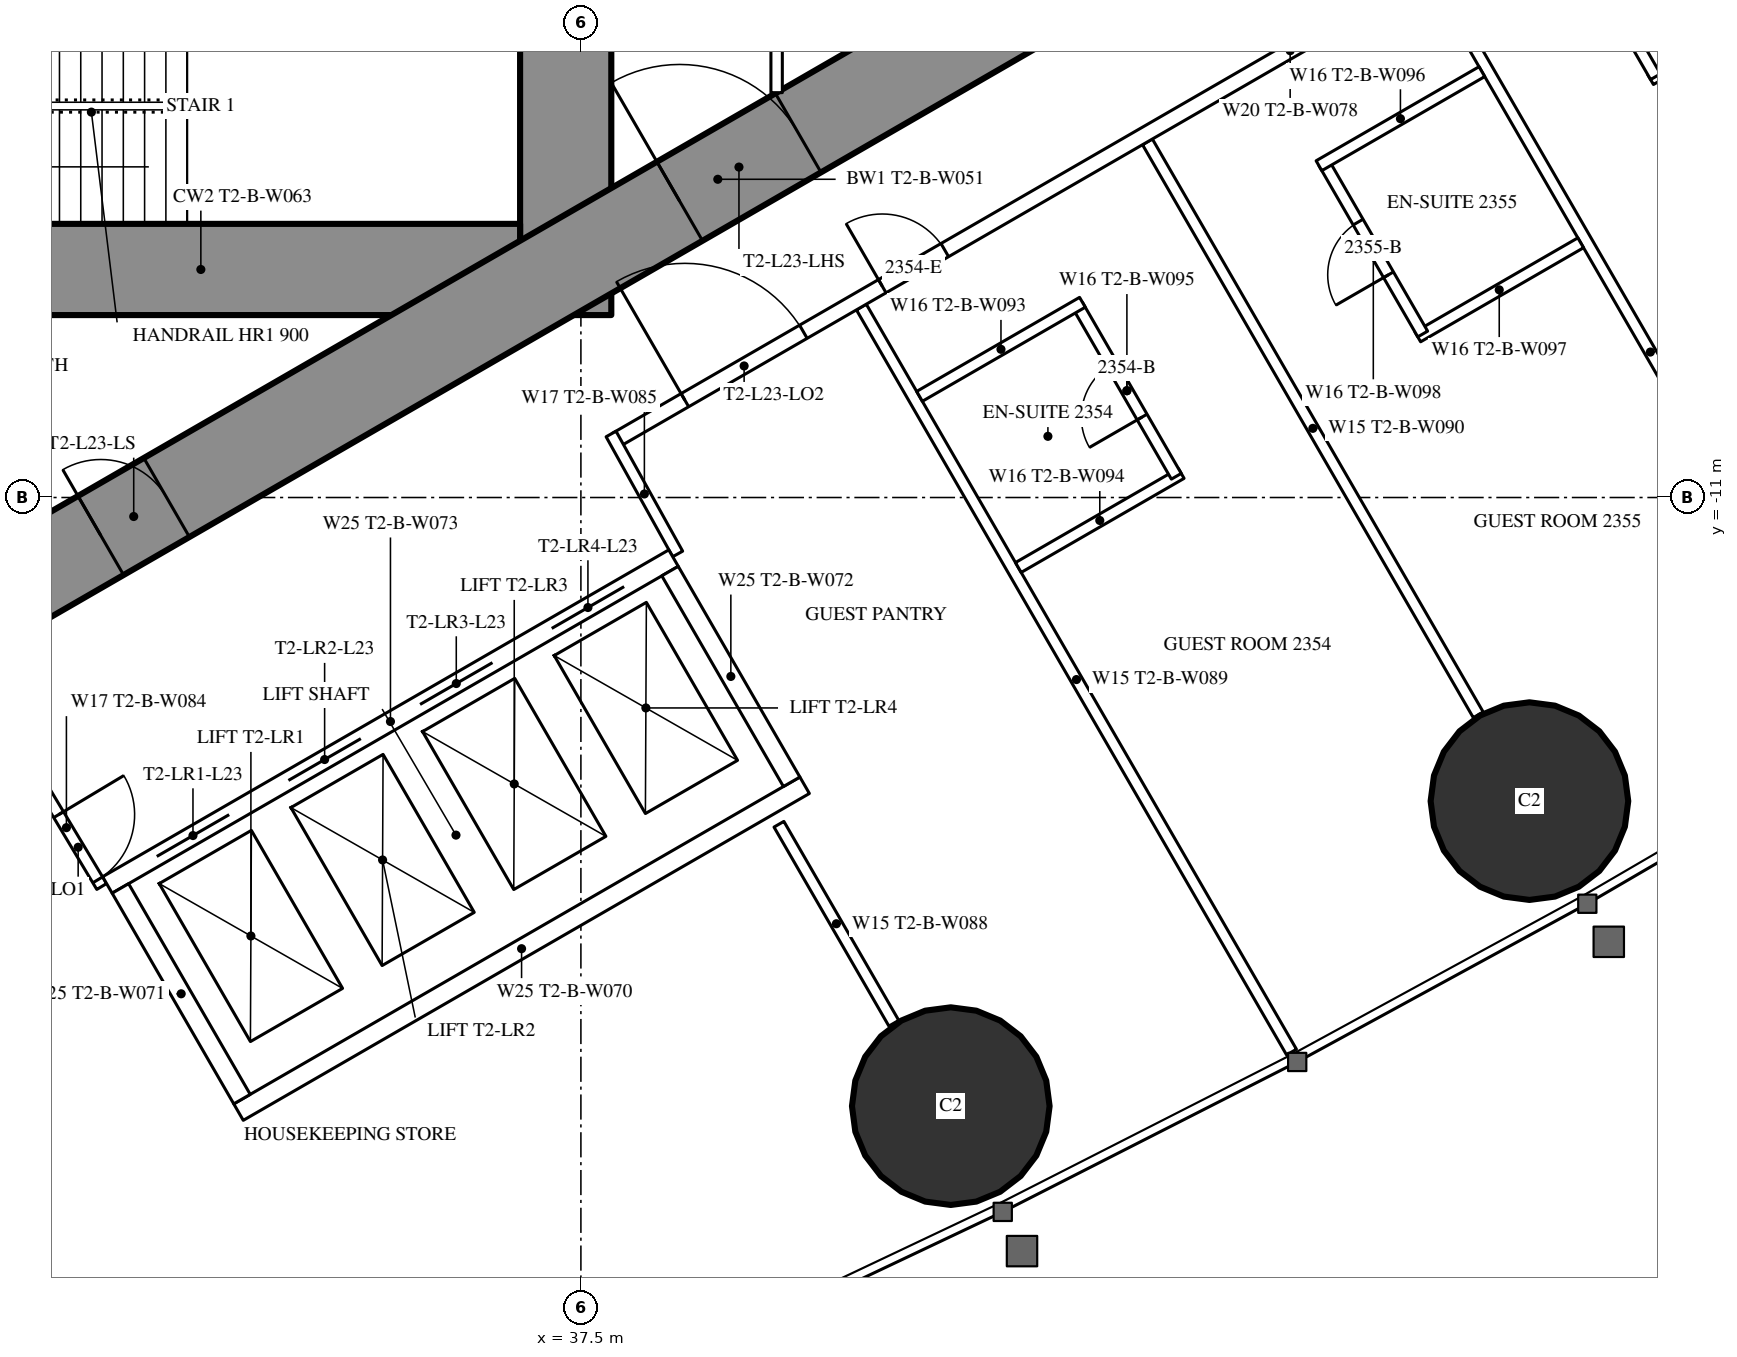
"""IFC4 building model, lengths in metres.
Left out: names, types, materials, properties, quantities, classifications, styles, units other than length and angle.
Written with IfcOpenShell. Run it as: python <this file> out.ifc"""

import sys

from ifc_helpers import new_model, si_unit, direction, frame, frame_2d, origin, origin_2d, place, context, subcontext, project, spatial, rectangle, hollow_circle, extrude, element, fill, save


model = new_model("IFC4")
c1 = context("Model", 3, precision=1e-05, world=origin(), true_north=direction((0.0, 1.0)))
c2 = subcontext(c1, "Body", "Model", "MODEL_VIEW")
j1 = project(units=[si_unit("LENGTHUNIT", "METRE"), si_unit("PLANEANGLEUNIT", "RADIAN")], contexts=[c1])
p1 = place(None, origin())
s1 = spatial("IfcSite", under=j1, at=p1, CompositionType="ELEMENT")
p2 = place(p1, origin())
s2 = spatial("IfcBuilding", under=s1, at=p2, CompositionType="ELEMENT")
p3 = place(p2, frame((0.0, 0.0, 90.6)))
s3 = spatial("IfcBuildingStorey", under=s2, at=p3, CompositionType="ELEMENT", Elevation=90.6)
for number, where, z_axis, x_axis in (
    (1, (42.366, -19.007, 0.0), (0.0, 0.0, 1.0), (1.0, 0.0, 0.0)),
    (2, (49.979, -14.994, 0.0), (0.0, 0.0, 1.0), (1.0, 0.0, 0.0)),
):
    element("IfcColumn", number, at=place(p3, frame(where, z_axis=z_axis, x_axis=x_axis)), inside=s3, PredefinedType="COLUMN", context=c2, shape_type="SweptSolid", body=[
        extrude(hollow_circle(Radius=1.3, WallThickness=0.1, at=origin_2d()), origin(), (0.0, 0.0, 1.0), 3.5),
    ])
p4 = place(p3, frame((37.3, -8.6, 0.0), z_axis=(0.0, 0.0, 1.0), x_axis=(0.0, 1.0, 0.0)))
e3 = element("IfcWall", 3, at=p4, inside=s3, PredefinedType="SHEAR", context=c2, shape_type="SweptSolid", body=[
    extrude(rectangle(XDim=17.2, YDim=1.2, at=frame_2d((8.6, 0.0))), origin(), (0.0, 0.0, 1.0), 3.5),
])
p5 = place(p4, frame((7.7, 0.0, 0.0)))
e4 = element("IfcOpeningElement", 4, at=p5, cuts=e3, PredefinedType="OPENING", context=c2, shape_type="SweptSolid", body=[
    extrude(rectangle(XDim=1.8, YDim=2.2, at=frame_2d((0.9, 1.1))), frame((0.0, 0.61, 0.0), z_axis=(0.0, -1.0, 0.0), x_axis=(1.0, 0.0, 0.0)), (0.0, 0.0, 1.0), 1.22),
])
p6 = place(p3, frame((28.3, -8.0, 0.0), z_axis=(0.0, 0.0, 1.0), x_axis=(1.0, 0.0, 0.0)))
e5 = element("IfcWall", 5, at=p6, inside=s3, PredefinedType="SHEAR", context=c2, shape_type="SweptSolid", body=[
    extrude(rectangle(XDim=8.4, YDim=1.2, at=frame_2d((4.2, 0.0))), origin(), (0.0, 0.0, 1.0), 3.5),
])
p7 = place(p6, frame((0.25, 0.0, 0.0)))
e6 = element("IfcOpeningElement", 6, at=p7, cuts=e5, PredefinedType="OPENING", context=c2, shape_type="SweptSolid", body=[
    extrude(rectangle(XDim=1.0, YDim=2.2, at=frame_2d((0.5, 1.1))), frame((0.0, 0.61, 0.0), z_axis=(0.0, -1.0, 0.0), x_axis=(1.0, 0.0, 0.0)), (0.0, 0.0, 1.0), 1.22),
])
p8 = place(p3, frame((27.2, -13.8, 0.0), z_axis=(0.0, 0.0, 1.0), x_axis=(0.866027159892, 0.499996958321, 0.0)))
e7 = element("IfcWall", 7, at=p8, inside=s3, PredefinedType="SHEAR", context=c2, shape_type="SweptSolid", body=[
    extrude(rectangle(XDim=27.947, YDim=1.2, at=frame_2d((13.973, 0.0))), origin(), (0.0, 0.0, 1.0), 3.5),
])
p9 = place(p8, frame((4.6, 0.0, 0.0)))
e8 = element("IfcOpeningElement", 8, at=p9, cuts=e7, PredefinedType="OPENING", context=c2, shape_type="SweptSolid", body=[
    extrude(rectangle(XDim=1.0, YDim=2.2, at=frame_2d((0.5, 1.1))), frame((0.0, 0.61, 0.0), z_axis=(0.0, -1.0, 0.0), x_axis=(1.0, 0.0, 0.0)), (0.0, 0.0, 1.0), 1.22),
])
p10 = place(p8, frame((13.395, 0.0, 0.0)))
e9 = element("IfcOpeningElement", 9, at=p10, cuts=e7, PredefinedType="OPENING", context=c2, shape_type="SweptSolid", body=[
    extrude(rectangle(XDim=1.8, YDim=2.2, at=frame_2d((0.9, 1.1))), frame((0.0, 0.61, 0.0), z_axis=(0.0, -1.0, 0.0), x_axis=(1.0, 0.0, 0.0)), (0.0, 0.0, 1.0), 1.22),
])
p11 = place(p3, frame((41.19, -8.494, 0.0), z_axis=(0.0, 0.0, 1.0), x_axis=(0.49999258054, -0.866029687369, 0.0)))
e10 = element("IfcWall", 10, at=p11, inside=s3, PredefinedType="PARTITIONING", context=c2, shape_type="SweptSolid", body=[
    extrude(rectangle(XDim=11.318, YDim=0.15, at=frame_2d((5.659, 0.0))), origin(), (0.0, 0.0, 1.0), 3.25),
])
p12 = place(p3, frame((44.954, -6.321, 0.0), z_axis=(0.0, 0.0, 1.0), x_axis=(0.500018676722, -0.866014620505, 0.0)))
e11 = element("IfcWall", 11, at=p12, inside=s3, PredefinedType="PARTITIONING", context=c2, shape_type="SweptSolid", body=[
    extrude(rectangle(XDim=8.704, YDim=0.15, at=frame_2d((4.352, 0.0))), origin(), (0.0, 0.0, 1.0), 2.2),
])
p13 = place(p3, frame((48.719, -4.147, 0.0), z_axis=(0.0, 0.0, 1.0), x_axis=(0.499990498062, -0.866030889661, 0.0)))
e12 = element("IfcWall", 12, at=p13, inside=s3, PredefinedType="PARTITIONING", context=c2, shape_type="SweptSolid", body=[
    extrude(rectangle(XDim=11.406, YDim=0.15, at=frame_2d((5.703, 0.0))), origin(), (0.0, 0.0, 1.0), 3.25),
])
p14 = place(p3, frame((40.105, -15.299, 0.0), z_axis=(0.0, 0.0, 1.0), x_axis=(0.499978822259, -0.866037630414, 0.0)))
e13 = element("IfcWall", 13, at=p14, inside=s3, PredefinedType="PARTITIONING", context=c2, shape_type="SweptSolid", body=[
    extrude(rectangle(XDim=3.023, YDim=0.15, at=frame_2d((1.511, 0.0))), origin(), (0.0, 0.0, 1.0), 3.25),
])
p15 = place(p3, frame((37.96, -10.243, 0.0), z_axis=(0.0, 0.0, 1.0), x_axis=(0.866026429433, 0.499998223521, 0.0)))
e14 = element("IfcWall", 14, at=p15, inside=s3, PredefinedType="PARTITIONING", context=c2, shape_type="SweptSolid", body=[
    extrude(rectangle(XDim=20.487, YDim=0.2, at=frame_2d((10.243, 0.0))), origin(), (0.0, 0.0, 1.0), 3.25),
])
p16 = place(p15, frame((4.047, 0.0, 0.0)))
e15 = element("IfcOpeningElement", 15, at=p16, cuts=e14, PredefinedType="OPENING", context=c2, shape_type="SweptSolid", body=[
    extrude(rectangle(XDim=0.95, YDim=2.2, at=frame_2d((0.475, 1.1))), frame((0.0, 0.11, 0.0), z_axis=(0.0, -1.0, 0.0), x_axis=(1.0, 0.0, 0.0)), (0.0, 0.0, 1.0), 0.22),
])
p17 = place(p15, frame((11.04, 0.0, 0.0)))
e16 = element("IfcOpeningElement", 16, at=p17, cuts=e14, PredefinedType="OPENING", context=c2, shape_type="SweptSolid", body=[
    extrude(rectangle(XDim=0.95, YDim=2.2, at=frame_2d((0.475, 1.1))), frame((0.0, 0.11, 0.0), z_axis=(0.0, -1.0, 0.0), x_axis=(1.0, 0.0, 0.0)), (0.0, 0.0, 1.0), 0.22),
])
p18 = place(p15, frame((13.035, 0.0, 0.0)))
e17 = element("IfcOpeningElement", 17, at=p18, cuts=e14, PredefinedType="OPENING", context=c2, shape_type="SweptSolid", body=[
    extrude(rectangle(XDim=0.95, YDim=2.2, at=frame_2d((0.475, 1.1))), frame((0.0, 0.11, 0.0), z_axis=(0.0, -1.0, 0.0), x_axis=(1.0, 0.0, 0.0)), (0.0, 0.0, 1.0), 0.22),
])
p19 = place(p15, frame((17.085, 0.0, 0.0)))
e18 = element("IfcOpeningElement", 18, at=p19, cuts=e14, PredefinedType="OPENING", context=c2, shape_type="SweptSolid", body=[
    extrude(rectangle(XDim=0.95, YDim=2.2, at=frame_2d((0.475, 1.1))), frame((0.0, 0.11, 0.0), z_axis=(0.0, -1.0, 0.0), x_axis=(1.0, 0.0, 0.0)), (0.0, 0.0, 1.0), 0.22),
])
p20 = place(p15, frame((1.048, 0.0, 0.0)))
e19 = element("IfcOpeningElement", 19, at=p20, cuts=e14, PredefinedType="OPENING", context=c2, shape_type="SweptSolid", body=[
    extrude(rectangle(XDim=1.8, YDim=2.2, at=frame_2d((0.9, 1.1))), frame((0.0, 0.11, 0.0), z_axis=(0.0, -1.0, 0.0), x_axis=(1.0, 0.0, 0.0)), (0.0, 0.0, 1.0), 0.22),
])
p21 = place(p3, frame((30.267, -14.569, 0.0), z_axis=(0.0, 0.0, 1.0), x_axis=(0.514336634837, -0.857588377991, 0.0)))
e20 = element("IfcWall", 20, at=p21, inside=s3, PredefinedType="PARTITIONING", context=c2, shape_type="SweptSolid", body=[
    extrude(rectangle(XDim=1.805, YDim=0.15, at=frame_2d((0.903, 0.0))), origin(), (0.0, 0.0, 1.0), 3.25),
])
p22 = place(p21, frame((0.703, 0.0, 0.0)))
e21 = element("IfcOpeningElement", 21, at=p22, cuts=e20, PredefinedType="OPENING", context=c2, shape_type="SweptSolid", body=[
    extrude(rectangle(XDim=1.0, YDim=2.2, at=frame_2d((0.5, 1.1))), frame((0.0, 0.085, 0.0), z_axis=(0.0, -1.0, 0.0), x_axis=(1.0, 0.0, 0.0)), (0.0, 0.0, 1.0), 0.17),
])
p23 = place(p3, frame((38.773, -11.742, 0.0), z_axis=(0.0, 0.0, 1.0), x_axis=(-0.485528096672, 0.8742210632, 0.0)))
e22 = element("IfcWall", 22, at=p23, inside=s3, PredefinedType="PARTITIONING", context=c2, shape_type="SweptSolid", body=[
    extrude(rectangle(XDim=1.805, YDim=0.15, at=frame_2d((0.903, 0.0))), origin(), (0.0, 0.0, 1.0), 3.25),
])
p24 = place(p3, frame((43.255, -11.921, 0.0), z_axis=(0.0, 0.0, 1.0), x_axis=(0.866006523861, 0.500032699561, 0.0)))
e23 = element("IfcWall", 23, at=p24, inside=s3, PredefinedType="PARTITIONING", context=c2, shape_type="SweptSolid", body=[
    extrude(rectangle(XDim=2.475, YDim=0.15, at=frame_2d((1.237, 0.0))), origin(), (0.0, 0.0, 1.0), 3.25),
])
p25 = place(p3, frame((44.033, -8.469, 0.0), z_axis=(0.0, 0.0, 1.0), x_axis=(0.500047596559, -0.865997922154, 0.0)))
e24 = element("IfcWall", 24, at=p25, inside=s3, PredefinedType="PARTITIONING", context=c2, shape_type="SweptSolid", body=[
    extrude(rectangle(XDim=2.6, YDim=0.15, at=frame_2d((1.3, 0.0))), origin(), (0.0, 0.0, 1.0), 3.25),
])
p26 = place(p25, frame((0.9, 0.0, 0.0)))
e25 = element("IfcOpeningElement", 25, at=p26, cuts=e24, PredefinedType="OPENING", context=c2, shape_type="SweptSolid", body=[
    extrude(rectangle(XDim=0.8, YDim=2.2, at=frame_2d((0.4, 1.1))), frame((0.0, 0.085, 0.0), z_axis=(0.0, -1.0, 0.0), x_axis=(1.0, 0.0, 0.0)), (0.0, 0.0, 1.0), 0.17),
])
p27 = place(p3, frame((41.955, -9.669, 0.0), z_axis=(0.0, 0.0, 1.0), x_axis=(0.866006523861, 0.500032699561, 0.0)))
e26 = element("IfcWall", 26, at=p27, inside=s3, PredefinedType="PARTITIONING", context=c2, shape_type="SweptSolid", body=[
    extrude(rectangle(XDim=2.475, YDim=0.15, at=frame_2d((1.237, 0.0))), origin(), (0.0, 0.0, 1.0), 3.25),
])
p28 = place(p3, frame((48.51, -8.887, 0.0), z_axis=(0.0, 0.0, 1.0), x_axis=(0.866031185235, 0.4999899861, 0.0)))
e27 = element("IfcWall", 27, at=p28, inside=s3, PredefinedType="PARTITIONING", context=c2, shape_type="SweptSolid", body=[
    extrude(rectangle(XDim=2.475, YDim=0.15, at=frame_2d((1.238, 0.0))), origin(), (0.0, 0.0, 1.0), 3.25),
])
p29 = place(p3, frame((47.275, -6.597, 0.0), z_axis=(0.0, 0.0, 1.0), x_axis=(0.499936506574, -0.866062058628, 0.0)))
e28 = element("IfcWall", 28, at=p29, inside=s3, PredefinedType="PARTITIONING", context=c2, shape_type="SweptSolid", body=[
    extrude(rectangle(XDim=2.6, YDim=0.15, at=frame_2d((1.3, 0.0))), origin(), (0.0, 0.0, 1.0), 3.25),
])
p30 = place(p29, frame((0.9, 0.0, 0.0)))
e29 = element("IfcOpeningElement", 29, at=p30, cuts=e28, PredefinedType="OPENING", context=c2, shape_type="SweptSolid", body=[
    extrude(rectangle(XDim=0.8, YDim=2.2, at=frame_2d((0.4, 1.1))), frame((0.0, 0.085, 0.0), z_axis=(0.0, -1.0, 0.0), x_axis=(1.0, 0.0, 0.0)), (0.0, 0.0, 1.0), 0.17),
])
for number, where, z_axis, x_axis in (
    (30, (47.21, -6.635, 0.0), (0.0, 0.0, 1.0), (0.866, 0.5, 0.0)),
    (31, (51.573, -5.502, 0.0), (0.0, 0.0, 1.0), (0.866, 0.5, 0.0)),
):
    element("IfcWall", number, at=place(p3, frame(where, z_axis=z_axis, x_axis=x_axis)), inside=s3, PredefinedType="PARTITIONING", context=c2, shape_type="SweptSolid", body=[
        extrude(rectangle(XDim=2.475, YDim=0.15, at=frame_2d((1.237, 0.0))), origin(), (0.0, 0.0, 1.0), 3.25),
    ])
p31 = place(p3, frame((50.338, -3.213, 0.0), z_axis=(0.0, 0.0, 1.0), x_axis=(0.500047596559, -0.865997922154, 0.0)))
e32 = element("IfcWall", 32, at=p31, inside=s3, PredefinedType="PARTITIONING", context=c2, shape_type="SweptSolid", body=[
    extrude(rectangle(XDim=2.6, YDim=0.15, at=frame_2d((1.3, 0.0))), origin(), (0.0, 0.0, 1.0), 3.25),
])
p32 = place(p31, frame((0.9, 0.0, 0.0)))
e33 = element("IfcOpeningElement", 33, at=p32, cuts=e32, PredefinedType="OPENING", context=c2, shape_type="SweptSolid", body=[
    extrude(rectangle(XDim=0.8, YDim=2.2, at=frame_2d((0.4, 1.1))), frame((0.0, 0.085, 0.0), z_axis=(0.0, -1.0, 0.0), x_axis=(1.0, 0.0, 0.0)), (0.0, 0.0, 1.0), 0.17),
])
p33 = place(p3, frame((40.075, -5.674, 0.0), z_axis=(0.0, 0.0, 1.0), x_axis=(0.0, 1.0, 0.0)))
e34 = element("IfcWall", 34, at=p33, inside=s3, PredefinedType="PARTITIONING", context=c2, shape_type="SweptSolid", body=[
    extrude(rectangle(XDim=6.874, YDim=0.15, at=frame_2d((3.437, 0.0))), origin(), (0.0, 0.0, 1.0), 3.25),
])
p34 = place(p33, frame((2.537, 0.0, 0.0)))
e35 = element("IfcOpeningElement", 35, at=p34, cuts=e34, PredefinedType="OPENING", context=c2, shape_type="SweptSolid", body=[
    extrude(rectangle(XDim=1.8, YDim=2.2, at=frame_2d((0.9, 1.1))), frame((0.0, 0.085, 0.0), z_axis=(0.0, -1.0, 0.0), x_axis=(1.0, 0.0, 0.0)), (0.0, 0.0, 1.0), 0.17),
])
p35 = place(p3, frame((31.271, -16.097, 0.0), z_axis=(0.0, 0.0, 1.0), x_axis=(0.86604045752, 0.499973925258, 0.0)))
e36 = element("IfcWall", 36, at=p35, inside=s3, PredefinedType="PARTITIONING", context=c2, shape_type="SweptSolid", body=[
    extrude(rectangle(XDim=8.6, YDim=0.25, at=frame_2d((4.3, 0.0))), origin(), (0.0, 0.0, 1.0), 3.25),
])
p36 = place(p35, frame((0.75, 0.0, 0.0)))
e37 = element("IfcOpeningElement", 37, at=p36, cuts=e36, PredefinedType="OPENING", context=c2, shape_type="SweptSolid", body=[
    extrude(rectangle(XDim=1.1, YDim=2.2, at=frame_2d((0.55, 1.1))), frame((0.0, 0.135, 0.0), z_axis=(0.0, -1.0, 0.0), x_axis=(1.0, 0.0, 0.0)), (0.0, 0.0, 1.0), 0.27),
])
p37 = place(p35, frame((2.75, 0.0, 0.0)))
e38 = element("IfcOpeningElement", 38, at=p37, cuts=e36, PredefinedType="OPENING", context=c2, shape_type="SweptSolid", body=[
    extrude(rectangle(XDim=1.1, YDim=2.2, at=frame_2d((0.55, 1.1))), frame((0.0, 0.135, 0.0), z_axis=(0.0, -1.0, 0.0), x_axis=(1.0, 0.0, 0.0)), (0.0, 0.0, 1.0), 0.27),
])
p38 = place(p35, frame((4.75, 0.0, 0.0)))
e39 = element("IfcOpeningElement", 39, at=p38, cuts=e36, PredefinedType="OPENING", context=c2, shape_type="SweptSolid", body=[
    extrude(rectangle(XDim=1.1, YDim=2.2, at=frame_2d((0.55, 1.1))), frame((0.0, 0.135, 0.0), z_axis=(0.0, -1.0, 0.0), x_axis=(1.0, 0.0, 0.0)), (0.0, 0.0, 1.0), 0.27),
])
p39 = place(p35, frame((6.75, 0.0, 0.0)))
e40 = element("IfcOpeningElement", 40, at=p39, cuts=e36, PredefinedType="OPENING", context=c2, shape_type="SweptSolid", body=[
    extrude(rectangle(XDim=1.1, YDim=2.2, at=frame_2d((0.55, 1.1))), frame((0.0, 0.135, 0.0), z_axis=(0.0, -1.0, 0.0), x_axis=(1.0, 0.0, 0.0)), (0.0, 0.0, 1.0), 0.27),
])
p40 = place(p3, frame((32.996, -19.086, 0.0), z_axis=(0.0, 0.0, 1.0), x_axis=(0.866028165386, 0.499995216735, 0.0)))
e41 = element("IfcWall", 41, at=p40, inside=s3, PredefinedType="PARTITIONING", context=c2, shape_type="SweptSolid", body=[
    extrude(rectangle(XDim=8.6, YDim=0.25, at=frame_2d((4.3, 0.0))), origin(), (0.0, 0.0, 1.0), 3.25),
])
for number, where, z_axis, x_axis in (
    (42, (31.441, -16.143, 0.0), (0.0, 0.0, 1.0), (0.5, -0.866, 0.0)),
    (43, (38.673, -11.968, 0.0), (0.0, 0.0, 1.0), (0.5, -0.866, 0.0)),
):
    element("IfcWall", number, at=place(p3, frame(where, z_axis=z_axis, x_axis=x_axis)), inside=s3, PredefinedType="PARTITIONING", context=c2, shape_type="SweptSolid", body=[
        extrude(rectangle(XDim=3.201, YDim=0.25, at=frame_2d((1.6, 0.0))), origin(), (0.0, 0.0, 1.0), 3.25),
    ])
p41 = place(p26, origin())
e44 = element("IfcDoor", 44, at=p41, inside=s3, OperationType="SINGLE_SWING_RIGHT", PredefinedType="DOOR", context=c2, shape_type="SweptSolid", body=[
    extrude(rectangle(XDim=0.8, YDim=2.2, at=frame_2d((0.4, 1.1))), frame((0.0, 0.025, 0.0), z_axis=(0.0, -1.0, 0.0), x_axis=(1.0, 0.0, 0.0)), (0.0, 0.0, 1.0), 0.05),
])
fill(e25, e44)
p42 = place(p16, origin())
e45 = element("IfcDoor", 45, at=p42, inside=s3, OperationType="SINGLE_SWING_LEFT", PredefinedType="DOOR", context=c2, shape_type="SweptSolid", body=[
    extrude(rectangle(XDim=0.95, YDim=2.2, at=frame_2d((0.475, 1.1))), frame((0.0, 0.025, 0.0), z_axis=(0.0, -1.0, 0.0), x_axis=(1.0, 0.0, 0.0)), (0.0, 0.0, 1.0), 0.05),
])
fill(e15, e45)
p43 = place(p30, origin())
e46 = element("IfcDoor", 46, at=p43, inside=s3, OperationType="SINGLE_SWING_RIGHT", PredefinedType="DOOR", context=c2, shape_type="SweptSolid", body=[
    extrude(rectangle(XDim=0.8, YDim=2.2, at=frame_2d((0.4, 1.1))), frame((0.0, 0.025, 0.0), z_axis=(0.0, -1.0, 0.0), x_axis=(1.0, 0.0, 0.0)), (0.0, 0.0, 1.0), 0.05),
])
fill(e29, e46)
p44 = place(p22, origin())
e47 = element("IfcDoor", 47, at=p44, inside=s3, OperationType="SINGLE_SWING_LEFT", PredefinedType="DOOR", context=c2, shape_type="SweptSolid", body=[
    extrude(rectangle(XDim=1.0, YDim=2.2, at=frame_2d((0.5, 1.1))), frame((0.0, 0.025, 0.0), z_axis=(0.0, -1.0, 0.0), x_axis=(1.0, 0.0, 0.0)), (0.0, 0.0, 1.0), 0.05),
])
fill(e21, e47)
p45 = place(p20, origin())
e48 = element("IfcDoor", 48, at=p45, inside=s3, OperationType="DOUBLE_DOOR_SINGLE_SWING", PredefinedType="DOOR", context=c2, shape_type="SweptSolid", body=[
    extrude(rectangle(XDim=1.8, YDim=2.2, at=frame_2d((0.9, 1.1))), frame((0.0, 0.025, 0.0), z_axis=(0.0, -1.0, 0.0), x_axis=(1.0, 0.0, 0.0)), (0.0, 0.0, 1.0), 0.05),
])
fill(e19, e48)
p46 = place(p9, origin())
e49 = element("IfcDoor", 49, at=p46, inside=s3, OperationType="SINGLE_SWING_LEFT", PredefinedType="DOOR", context=c2, shape_type="SweptSolid", body=[
    extrude(rectangle(XDim=1.0, YDim=2.2, at=frame_2d((0.5, 1.1))), frame((0.0, 0.025, 0.0), z_axis=(0.0, -1.0, 0.0), x_axis=(1.0, 0.0, 0.0)), (0.0, 0.0, 1.0), 0.05),
])
fill(e8, e49)
p47 = place(p10, origin())
e50 = element("IfcDoor", 50, at=p47, inside=s3, OperationType="DOUBLE_DOOR_SINGLE_SWING", PredefinedType="DOOR", context=c2, shape_type="SweptSolid", body=[
    extrude(rectangle(XDim=1.8, YDim=2.2, at=frame_2d((0.9, 1.1))), frame((0.0, 0.025, 0.0), z_axis=(0.0, -1.0, 0.0), x_axis=(1.0, 0.0, 0.0)), (0.0, 0.0, 1.0), 0.05),
])
fill(e9, e50)
p48 = place(p36, origin())
e51 = element("IfcDoor", 51, at=p48, inside=s3, OperationType="DOUBLE_DOOR_SLIDING", PredefinedType="USERDEFINED", context=c2, shape_type="SweptSolid", body=[
    extrude(rectangle(XDim=1.1, YDim=2.2, at=frame_2d((0.55, 1.1))), frame((0.0, 0.025, 0.0), z_axis=(0.0, -1.0, 0.0), x_axis=(1.0, 0.0, 0.0)), (0.0, 0.0, 1.0), 0.05),
])
fill(e37, e51)
p49 = place(p37, origin())
e52 = element("IfcDoor", 52, at=p49, inside=s3, OperationType="DOUBLE_DOOR_SLIDING", PredefinedType="USERDEFINED", context=c2, shape_type="SweptSolid", body=[
    extrude(rectangle(XDim=1.1, YDim=2.2, at=frame_2d((0.55, 1.1))), frame((0.0, 0.025, 0.0), z_axis=(0.0, -1.0, 0.0), x_axis=(1.0, 0.0, 0.0)), (0.0, 0.0, 1.0), 0.05),
])
fill(e38, e52)
p50 = place(p38, origin())
e53 = element("IfcDoor", 53, at=p50, inside=s3, OperationType="DOUBLE_DOOR_SLIDING", PredefinedType="USERDEFINED", context=c2, shape_type="SweptSolid", body=[
    extrude(rectangle(XDim=1.1, YDim=2.2, at=frame_2d((0.55, 1.1))), frame((0.0, 0.025, 0.0), z_axis=(0.0, -1.0, 0.0), x_axis=(1.0, 0.0, 0.0)), (0.0, 0.0, 1.0), 0.05),
])
fill(e39, e53)
p51 = place(p39, origin())
e54 = element("IfcDoor", 54, at=p51, inside=s3, OperationType="DOUBLE_DOOR_SLIDING", PredefinedType="USERDEFINED", context=c2, shape_type="SweptSolid", body=[
    extrude(rectangle(XDim=1.1, YDim=2.2, at=frame_2d((0.55, 1.1))), frame((0.0, 0.025, 0.0), z_axis=(0.0, -1.0, 0.0), x_axis=(1.0, 0.0, 0.0)), (0.0, 0.0, 1.0), 0.05),
])
fill(e40, e54)
save(model, sys.argv[1])
